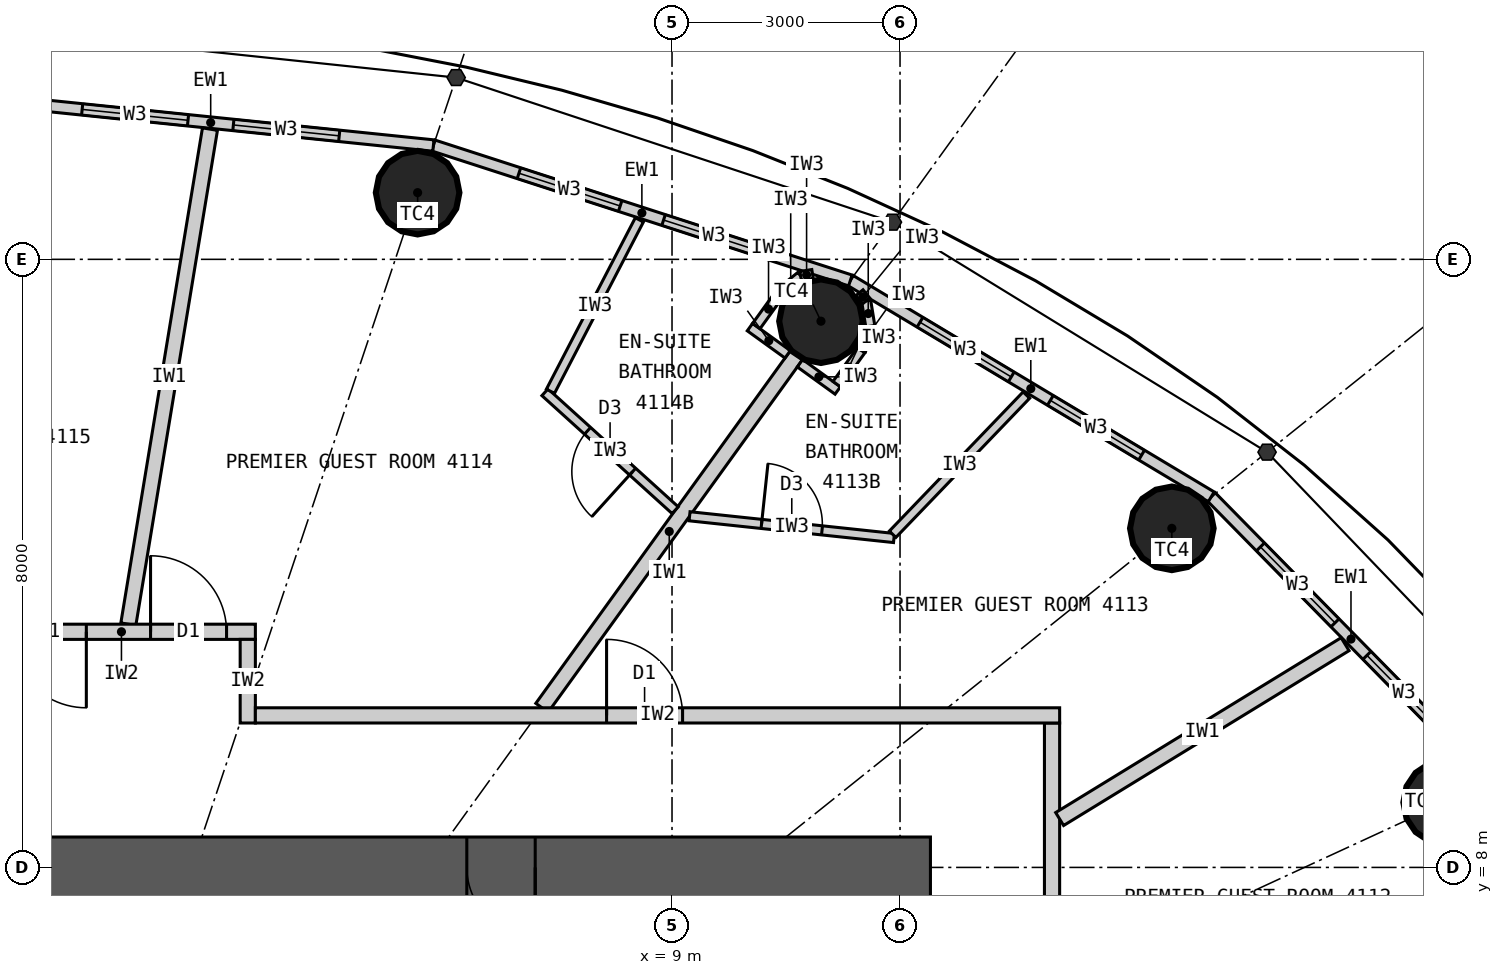
"""IFC4 building model, lengths in metres.
Left out: names, types, materials, properties, quantities, classifications, styles, units other than length and angle.
Written with IfcOpenShell. Run it as: python <this file> out.ifc"""

import sys

from ifc_helpers import new_model, si_unit, direction, frame, frame_2d, origin, origin_2d, place, context, subcontext, project, spatial, rectangle, circle, extrude, element, fill, save


model = new_model("IFC4")
c1 = context("Model", 3, precision=1e-05, world=origin(), true_north=direction((0.0, 1.0)))
c2 = subcontext(c1, "Body", "Model", "MODEL_VIEW")
j1 = project(units=[si_unit("LENGTHUNIT", "METRE"), si_unit("PLANEANGLEUNIT", "RADIAN")], contexts=[c1])
p1 = place(None, origin())
s1 = spatial("IfcSite", under=j1, at=p1, CompositionType="ELEMENT")
p2 = place(p1, origin())
s2 = spatial("IfcBuilding", under=s1, at=p2, CompositionType="ELEMENT")
p3 = place(p2, frame((0.0, 0.0, 156.6)))
s3 = spatial("IfcBuildingStorey", under=s2, at=p3, CompositionType="ELEMENT", Elevation=156.6)
for number, where, z_axis, x_axis in (
    (1, (19.172, 8.855, 0.0), (0.0, 0.0, 1.0), (1.0, 0.0, 0.0)),
    (2, (15.576, 12.461, 0.0), (0.0, 0.0, 1.0), (1.0, 0.0, 0.0)),
    (3, (10.96, 15.186, 0.0), (0.0, 0.0, 1.0), (1.0, 0.0, 0.0)),
    (4, (5.653, 16.877, 0.0), (0.0, 0.0, 1.0), (1.0, 0.0, 0.0)),
):
    element("IfcColumn", number, at=place(p3, frame(where, z_axis=z_axis, x_axis=x_axis)), inside=s3, PredefinedType="COLUMN", context=c2, shape_type="SweptSolid", body=[
        extrude(circle(Radius=0.55, at=origin_2d()), origin(), (0.0, 0.0, 1.0), 3.3),
    ])
p4 = place(p3, frame((-12.4, 8.0, 0.0), z_axis=(0.0, 0.0, 1.0), x_axis=(1.0, 0.0, 0.0)))
e5 = element("IfcWall", 5, at=p4, inside=s3, PredefinedType="SHEAR", context=c2, shape_type="SweptSolid", body=[
    extrude(rectangle(XDim=24.8, YDim=0.8, at=frame_2d((12.4, 0.0))), origin(), (0.0, 0.0, 1.0), 3.3),
])
p5 = place(p4, frame((11.1, 0.0, 0.0)))
e6 = element("IfcOpeningElement", 6, at=p5, cuts=e5, PredefinedType="OPENING", context=c2, shape_type="SweptSolid", body=[
    extrude(rectangle(XDim=1.2, YDim=2.2, at=frame_2d((0.6, 1.1))), frame((0.0, 0.41, 0.0), z_axis=(0.0, -1.0, 0.0), x_axis=(1.0, 0.0, 0.0)), (0.0, 0.0, 1.0), 0.82),
])
p6 = place(p4, frame((18.7, 0.0, 0.0)))
e7 = element("IfcOpeningElement", 7, at=p6, cuts=e5, PredefinedType="OPENING", context=c2, shape_type="SweptSolid", body=[
    extrude(rectangle(XDim=0.9, YDim=2.2, at=frame_2d((0.45, 1.1))), frame((0.0, 0.41, 0.0), z_axis=(0.0, -1.0, 0.0), x_axis=(1.0, 0.0, 0.0)), (0.0, 0.0, 1.0), 0.82),
])
p7 = place(p3, frame((19.772, 9.132, 0.0), z_axis=(0.0, 0.0, 1.0), x_axis=(-0.700727467776, 0.71342905457, 0.0)))
e8 = element("IfcWall", 8, at=p7, inside=s3, PredefinedType="ELEMENTEDWALL", context=c2, shape_type="SweptSolid", body=[
    extrude(rectangle(XDim=5.247, YDim=0.15, at=frame_2d((2.624, 0.0))), origin(), (0.0, 0.0, 1.0), 3.12),
])
p8 = place(p7, frame((0.924, 0.0, 0.9)))
e9 = element("IfcOpeningElement", 9, at=p8, cuts=e8, PredefinedType="OPENING", context=c2, shape_type="SweptSolid", body=[
    extrude(rectangle(XDim=1.4, YDim=1.9, at=frame_2d((0.7, 0.95))), frame((0.0, 0.085, 0.0), z_axis=(0.0, -1.0, 0.0), x_axis=(1.0, 0.0, 0.0)), (0.0, 0.0, 1.0), 0.17),
])
p9 = place(p7, frame((2.924, 0.0, 0.9)))
e10 = element("IfcOpeningElement", 10, at=p9, cuts=e8, PredefinedType="OPENING", context=c2, shape_type="SweptSolid", body=[
    extrude(rectangle(XDim=1.4, YDim=1.9, at=frame_2d((0.7, 0.95))), frame((0.0, 0.085, 0.0), z_axis=(0.0, -1.0, 0.0), x_axis=(1.0, 0.0, 0.0)), (0.0, 0.0, 1.0), 0.17),
])
p10 = place(p3, frame((16.095, 12.876, 0.0), z_axis=(0.0, 0.0, 1.0), x_axis=(-0.857695199231, 0.514158482587, 0.0)))
e11 = element("IfcWall", 11, at=p10, inside=s3, PredefinedType="ELEMENTEDWALL", context=c2, shape_type="SweptSolid", body=[
    extrude(rectangle(XDim=5.536, YDim=0.15, at=frame_2d((2.768, 0.0))), origin(), (0.0, 0.0, 1.0), 3.12),
])
p11 = place(p10, frame((1.068, 0.0, 0.9)))
e12 = element("IfcOpeningElement", 12, at=p11, cuts=e11, PredefinedType="OPENING", context=c2, shape_type="SweptSolid", body=[
    extrude(rectangle(XDim=1.4, YDim=1.9, at=frame_2d((0.7, 0.95))), frame((0.0, 0.085, 0.0), z_axis=(0.0, -1.0, 0.0), x_axis=(1.0, 0.0, 0.0)), (0.0, 0.0, 1.0), 0.17),
])
p12 = place(p10, frame((3.068, 0.0, 0.9)))
e13 = element("IfcOpeningElement", 13, at=p12, cuts=e11, PredefinedType="OPENING", context=c2, shape_type="SweptSolid", body=[
    extrude(rectangle(XDim=1.4, YDim=1.9, at=frame_2d((0.7, 0.95))), frame((0.0, 0.085, 0.0), z_axis=(0.0, -1.0, 0.0), x_axis=(1.0, 0.0, 0.0)), (0.0, 0.0, 1.0), 0.17),
])
p13 = place(p3, frame((11.346, 15.722, 0.0), z_axis=(0.0, 0.0, 1.0), x_axis=(-0.951432482129, 0.307857486429, 0.0)))
e14 = element("IfcWall", 14, at=p13, inside=s3, PredefinedType="ELEMENTEDWALL", context=c2, shape_type="SweptSolid", body=[
    extrude(rectangle(XDim=5.766, YDim=0.15, at=frame_2d((2.883, 0.0))), origin(), (0.0, 0.0, 1.0), 3.12),
])
p14 = place(p13, frame((1.183, 0.0, 0.9)))
e15 = element("IfcOpeningElement", 15, at=p14, cuts=e14, PredefinedType="OPENING", context=c2, shape_type="SweptSolid", body=[
    extrude(rectangle(XDim=1.4, YDim=1.9, at=frame_2d((0.7, 0.95))), frame((0.0, 0.085, 0.0), z_axis=(0.0, -1.0, 0.0), x_axis=(1.0, 0.0, 0.0)), (0.0, 0.0, 1.0), 0.17),
])
p15 = place(p13, frame((3.183, 0.0, 0.9)))
e16 = element("IfcOpeningElement", 16, at=p15, cuts=e14, PredefinedType="OPENING", context=c2, shape_type="SweptSolid", body=[
    extrude(rectangle(XDim=1.4, YDim=1.9, at=frame_2d((0.7, 0.95))), frame((0.0, 0.085, 0.0), z_axis=(0.0, -1.0, 0.0), x_axis=(1.0, 0.0, 0.0)), (0.0, 0.0, 1.0), 0.17),
])
p16 = place(p3, frame((5.86, 17.497, 0.0), z_axis=(0.0, 0.0, 1.0), x_axis=(-0.994751738032, 0.102318032045, 0.0)))
e17 = element("IfcWall", 17, at=p16, inside=s3, PredefinedType="ELEMENTEDWALL", context=c2, shape_type="SweptSolid", body=[
    extrude(rectangle(XDim=5.891, YDim=0.15, at=frame_2d((2.946, 0.0))), origin(), (0.0, 0.0, 1.0), 3.12),
])
p17 = place(p16, frame((1.246, 0.0, 0.9)))
e18 = element("IfcOpeningElement", 18, at=p17, cuts=e17, PredefinedType="OPENING", context=c2, shape_type="SweptSolid", body=[
    extrude(rectangle(XDim=1.4, YDim=1.9, at=frame_2d((0.7, 0.95))), frame((0.0, 0.085, 0.0), z_axis=(0.0, -1.0, 0.0), x_axis=(1.0, 0.0, 0.0)), (0.0, 0.0, 1.0), 0.17),
])
p18 = place(p16, frame((3.246, 0.0, 0.9)))
e19 = element("IfcOpeningElement", 19, at=p18, cuts=e17, PredefinedType="OPENING", context=c2, shape_type="SweptSolid", body=[
    extrude(rectangle(XDim=1.4, YDim=1.9, at=frame_2d((0.7, 0.95))), frame((0.0, 0.085, 0.0), z_axis=(0.0, -1.0, 0.0), x_axis=(1.0, 0.0, 0.0)), (0.0, 0.0, 1.0), 0.17),
])
p19 = place(p3, frame((14.0, -9.9, 0.0), z_axis=(0.0, 0.0, 1.0), x_axis=(0.0, 1.0, 0.0)))
e20 = element("IfcWall", 20, at=p19, inside=s3, PredefinedType="PARTITIONING", context=c2, shape_type="SweptSolid", body=[
    extrude(rectangle(XDim=19.8, YDim=0.2, at=frame_2d((9.9, 0.0))), origin(), (0.0, 0.0, 1.0), 3.12),
])
p20 = place(p19, frame((3.824, 0.0, 0.0)))
e21 = element("IfcOpeningElement", 21, at=p20, cuts=e20, PredefinedType="OPENING", context=c2, shape_type="SweptSolid", body=[
    extrude(rectangle(XDim=1.0, YDim=2.2, at=frame_2d((0.5, 1.1))), frame((0.0, 0.11, 0.0), z_axis=(0.0, -1.0, 0.0), x_axis=(1.0, 0.0, 0.0)), (0.0, 0.0, 1.0), 0.22),
])
p21 = place(p19, frame((8.719, 0.0, 0.0)))
e22 = element("IfcOpeningElement", 22, at=p21, cuts=e20, PredefinedType="OPENING", context=c2, shape_type="SweptSolid", body=[
    extrude(rectangle(XDim=1.0, YDim=2.2, at=frame_2d((0.5, 1.1))), frame((0.0, 0.11, 0.0), z_axis=(0.0, -1.0, 0.0), x_axis=(1.0, 0.0, 0.0)), (0.0, 0.0, 1.0), 0.22),
])
p22 = place(p19, frame((15.482, 0.0, 0.0)))
e23 = element("IfcOpeningElement", 23, at=p22, cuts=e20, PredefinedType="OPENING", context=c2, shape_type="SweptSolid", body=[
    extrude(rectangle(XDim=1.0, YDim=2.2, at=frame_2d((0.5, 1.1))), frame((0.0, 0.11, 0.0), z_axis=(0.0, -1.0, 0.0), x_axis=(1.0, 0.0, 0.0)), (0.0, 0.0, 1.0), 0.22),
])
p23 = place(p3, frame((14.1, 8.636, 0.0), z_axis=(0.0, 0.0, 1.0), x_axis=(0.852731884196, 0.522348862041, 0.0)))
e24 = element("IfcWall", 24, at=p23, inside=s3, PredefinedType="PARTITIONING", context=c2, shape_type="SweptSolid", body=[
    extrude(rectangle(XDim=4.404, YDim=0.2, at=frame_2d((2.202, 0.0))), origin(), (0.0, 0.0, 1.0), 3.12),
])
p24 = place(p3, frame((7.289, 10.1, 0.0), z_axis=(0.0, 0.0, 1.0), x_axis=(0.585222595178, 0.810872686735, 0.0)))
e25 = element("IfcWall", 25, at=p24, inside=s3, PredefinedType="PARTITIONING", context=c2, shape_type="SweptSolid", body=[
    extrude(rectangle(XDim=5.722, YDim=0.2, at=frame_2d((2.861, 0.0))), origin(), (0.0, 0.0, 1.0), 2.42),
])
p25 = place(p3, frame((1.847, 11.2, 0.0), z_axis=(0.0, 0.0, 1.0), x_axis=(0.162695449404, 0.986676335352, 0.0)))
e26 = element("IfcWall", 26, at=p25, inside=s3, PredefinedType="PARTITIONING", context=c2, shape_type="SweptSolid", body=[
    extrude(rectangle(XDim=6.601, YDim=0.2, at=frame_2d((3.301, 0.0))), origin(), (0.0, 0.0, 1.0), 3.12),
])
p26 = place(p3, frame((-0.006, 11.1, 0.0), z_axis=(0.0, 0.0, 1.0), x_axis=(1.0, 0.0, 0.0)))
e27 = element("IfcWall", 27, at=p26, inside=s3, PredefinedType="PARTITIONING", context=c2, shape_type="SweptSolid", body=[
    extrude(rectangle(XDim=3.524, YDim=0.2, at=frame_2d((1.762, 0.0))), origin(), (0.0, 0.0, 1.0), 3.12),
])
p27 = place(p26, frame((2.145, 0.0, 0.0)))
e28 = element("IfcOpeningElement", 28, at=p27, cuts=e27, PredefinedType="OPENING", context=c2, shape_type="SweptSolid", body=[
    extrude(rectangle(XDim=1.0, YDim=2.2, at=frame_2d((0.5, 1.1))), frame((0.0, 0.11, 0.0), z_axis=(0.0, -1.0, 0.0), x_axis=(1.0, 0.0, 0.0)), (0.0, 0.0, 1.0), 0.22),
])
p28 = place(p26, frame((0.3, 0.0, 0.0)))
e29 = element("IfcOpeningElement", 29, at=p28, cuts=e27, PredefinedType="OPENING", context=c2, shape_type="SweptSolid", body=[
    extrude(rectangle(XDim=1.0, YDim=2.2, at=frame_2d((0.5, 1.1))), frame((0.0, 0.11, 0.0), z_axis=(0.0, -1.0, 0.0), x_axis=(1.0, 0.0, 0.0)), (0.0, 0.0, 1.0), 0.22),
])
p29 = place(p3, frame((3.418, 9.9, 0.0), z_axis=(0.0, 0.0, 1.0), x_axis=(0.0, 1.0, 0.0)))
e30 = element("IfcWall", 30, at=p29, inside=s3, PredefinedType="PARTITIONING", context=c2, shape_type="SweptSolid", body=[
    extrude(rectangle(XDim=1.1, YDim=0.2, at=frame_2d((0.55, 0.0))), origin(), (0.0, 0.0, 1.0), 3.12),
])
p30 = place(p3, frame((9.231, 12.62, 0.0), z_axis=(0.0, 0.0, 1.0), x_axis=(0.99437860496, -0.10588290701, 0.0)))
e31 = element("IfcWall", 31, at=p30, inside=s3, PredefinedType="PARTITIONING", context=c2, shape_type="SweptSolid", body=[
    extrude(rectangle(XDim=2.705, YDim=0.12, at=frame_2d((1.352, 0.0))), origin(), (0.0, 0.0, 1.0), 3.12),
])
p31 = place(p30, frame((0.952, 0.0, 0.0)))
e32 = element("IfcOpeningElement", 32, at=p31, cuts=e31, PredefinedType="OPENING", context=c2, shape_type="SweptSolid", body=[
    extrude(rectangle(XDim=0.8, YDim=2.1, at=frame_2d((0.4, 1.05))), frame((0.0, 0.07, 0.0), z_axis=(0.0, -1.0, 0.0), x_axis=(1.0, 0.0, 0.0)), (0.0, 0.0, 1.0), 0.14),
])
p32 = place(p3, frame((11.902, 12.383, 0.0), z_axis=(0.0, 0.0, 1.0), x_axis=(0.69298385335, 0.720953104574, 0.0)))
e33 = element("IfcWall", 33, at=p32, inside=s3, PredefinedType="PARTITIONING", context=c2, shape_type="SweptSolid", body=[
    extrude(rectangle(XDim=2.54, YDim=0.12, at=frame_2d((1.27, 0.0))), origin(), (0.0, 0.0, 1.0), 3.12),
])
p33 = place(p3, frame((10.684, 14.633, 0.0), z_axis=(0.0, 0.0, 1.0), x_axis=(0.810921075692, -0.585155542568, 0.0)))
e34 = element("IfcWall", 34, at=p33, inside=s3, PredefinedType="PARTITIONING", context=c2, shape_type="SweptSolid", body=[
    extrude(rectangle(XDim=0.612, YDim=0.12, at=frame_2d((0.306, 0.0))), origin(), (0.0, 0.0, 1.0), 3.12),
])
p34 = place(p3, frame((11.167, 14.359, 0.0), z_axis=(0.0, 0.0, 1.0), x_axis=(0.585263549799, 0.810843127415, 0.0)))
e35 = element("IfcWall", 35, at=p34, inside=s3, PredefinedType="PARTITIONING", context=c2, shape_type="SweptSolid", body=[
    extrude(rectangle(XDim=0.55, YDim=0.12, at=frame_2d((0.275, 0.0))), origin(), (0.0, 0.0, 1.0), 3.12),
])
for number, where, z_axis, x_axis in (
    (36, (11.489, 14.804, 0.0), (0.0, 0.0, 1.0), (0.356, 0.935, 0.0)),
    (37, (11.609, 15.12, 0.0), (0.0, 0.0, 1.0), (-0.16, 0.987, 0.0)),
):
    element("IfcWall", number, at=place(p3, frame(where, z_axis=z_axis, x_axis=x_axis)), inside=s3, PredefinedType="PARTITIONING", context=c2, shape_type="SweptSolid", body=[
        extrude(rectangle(XDim=0.338, YDim=0.12, at=frame_2d((0.169, 0.0))), origin(), (0.0, 0.0, 1.0), 3.12),
    ])
p35 = place(p3, frame((11.555, 15.453, 0.0), z_axis=(0.0, 0.0, 1.0), x_axis=(-0.631711901025, 0.775203246964, 0.0)))
e38 = element("IfcWall", 38, at=p35, inside=s3, PredefinedType="PARTITIONING", context=c2, shape_type="SweptSolid", body=[
    extrude(rectangle(XDim=0.139, YDim=0.12, at=frame_2d((0.07, 0.0))), origin(), (0.0, 0.0, 1.0), 3.12),
])
p36 = place(p3, frame((9.042, 12.699, 0.0), z_axis=(0.0, 0.0, 1.0), x_axis=(-0.741100257539, 0.671394376112, 0.0)))
e39 = element("IfcWall", 39, at=p36, inside=s3, PredefinedType="PARTITIONING", context=c2, shape_type="SweptSolid", body=[
    extrude(rectangle(XDim=2.312, YDim=0.12, at=frame_2d((1.156, 0.0))), origin(), (0.0, 0.0, 1.0), 3.12),
])
p37 = place(p36, frame((0.756, 0.0, 0.0)))
e40 = element("IfcOpeningElement", 40, at=p37, cuts=e39, PredefinedType="OPENING", context=c2, shape_type="SweptSolid", body=[
    extrude(rectangle(XDim=0.8, YDim=2.1, at=frame_2d((0.4, 1.05))), frame((0.0, 0.07, 0.0), z_axis=(0.0, -1.0, 0.0), x_axis=(1.0, 0.0, 0.0)), (0.0, 0.0, 1.0), 0.14),
])
p38 = place(p3, frame((7.401, 14.264, 0.0), z_axis=(0.0, 0.0, 1.0), x_axis=(0.460505131319, 0.887657041897, 0.0)))
e41 = element("IfcWall", 41, at=p38, inside=s3, PredefinedType="PARTITIONING", context=c2, shape_type="SweptSolid", body=[
    extrude(rectangle(XDim=2.54, YDim=0.12, at=frame_2d((1.27, 0.0))), origin(), (0.0, 0.0, 1.0), 3.12),
])
p39 = place(p3, frame((10.522, 14.75, 0.0), z_axis=(0.0, 0.0, 1.0), x_axis=(-0.811057588427, 0.584966313777, 0.0)))
e42 = element("IfcWall", 42, at=p39, inside=s3, PredefinedType="PARTITIONING", context=c2, shape_type="SweptSolid", body=[
    extrude(rectangle(XDim=0.612, YDim=0.12, at=frame_2d((0.306, 0.0))), origin(), (0.0, 0.0, 1.0), 3.12),
])
p40 = place(p3, frame((10.109, 15.122, 0.0), z_axis=(0.0, 0.0, 1.0), x_axis=(0.585344718358, 0.810784534072, 0.0)))
e43 = element("IfcWall", 43, at=p40, inside=s3, PredefinedType="PARTITIONING", context=c2, shape_type="SweptSolid", body=[
    extrude(rectangle(XDim=0.55, YDim=0.12, at=frame_2d((0.275, 0.0))), origin(), (0.0, 0.0, 1.0), 3.12),
])
p41 = place(p3, frame((10.431, 15.568, 0.0), z_axis=(0.0, 0.0, 1.0), x_axis=(0.77505137267, 0.631898227345, 0.0)))
e44 = element("IfcWall", 44, at=p41, inside=s3, PredefinedType="PARTITIONING", context=c2, shape_type="SweptSolid", body=[
    extrude(rectangle(XDim=0.338, YDim=0.12, at=frame_2d((0.169, 0.0))), origin(), (0.0, 0.0, 1.0), 3.12),
])
p42 = place(p3, frame((10.693, 15.781, 0.0), z_axis=(0.0, 0.0, 1.0), x_axis=(0.987256785332, 0.159135287777, 0.0)))
e45 = element("IfcWall", 45, at=p42, inside=s3, PredefinedType="PARTITIONING", context=c2, shape_type="SweptSolid", body=[
    extrude(rectangle(XDim=0.158, YDim=0.12, at=frame_2d((0.079, 0.0))), origin(), (0.0, 0.0, 1.0), 3.12),
])
p43 = place(p3, frame((3.518, 10.0, 0.0), z_axis=(0.0, 0.0, 1.0), x_axis=(1.0, 0.0, 0.0)))
e46 = element("IfcWall", 46, at=p43, inside=s3, PredefinedType="PARTITIONING", context=c2, shape_type="SweptSolid", body=[
    extrude(rectangle(XDim=10.582, YDim=0.2, at=frame_2d((5.291, 0.0))), origin(), (0.0, 0.0, 1.0), 3.12),
])
p44 = place(p43, frame((4.621, 0.0, 0.0)))
e47 = element("IfcOpeningElement", 47, at=p44, cuts=e46, PredefinedType="OPENING", context=c2, shape_type="SweptSolid", body=[
    extrude(rectangle(XDim=1.0, YDim=2.2, at=frame_2d((0.5, 1.1))), frame((0.0, 0.11, 0.0), z_axis=(0.0, -1.0, 0.0), x_axis=(1.0, 0.0, 0.0)), (0.0, 0.0, 1.0), 0.22),
])
p45 = place(p8, origin())
e48 = element("IfcWindow", 48, at=p45, inside=s3, PartitioningType="SINGLE_PANEL", PredefinedType="WINDOW", context=c2, shape_type="SweptSolid", body=[
    extrude(rectangle(XDim=1.4, YDim=1.9, at=frame_2d((0.7, 0.95))), frame((0.0, 0.03, 0.0), z_axis=(0.0, -1.0, 0.0), x_axis=(1.0, 0.0, 0.0)), (0.0, 0.0, 1.0), 0.06),
])
fill(e9, e48)
p46 = place(p9, origin())
e49 = element("IfcWindow", 49, at=p46, inside=s3, PartitioningType="SINGLE_PANEL", PredefinedType="WINDOW", context=c2, shape_type="SweptSolid", body=[
    extrude(rectangle(XDim=1.4, YDim=1.9, at=frame_2d((0.7, 0.95))), frame((0.0, 0.03, 0.0), z_axis=(0.0, -1.0, 0.0), x_axis=(1.0, 0.0, 0.0)), (0.0, 0.0, 1.0), 0.06),
])
fill(e10, e49)
p47 = place(p11, origin())
e50 = element("IfcWindow", 50, at=p47, inside=s3, PartitioningType="SINGLE_PANEL", PredefinedType="WINDOW", context=c2, shape_type="SweptSolid", body=[
    extrude(rectangle(XDim=1.4, YDim=1.9, at=frame_2d((0.7, 0.95))), frame((0.0, 0.03, 0.0), z_axis=(0.0, -1.0, 0.0), x_axis=(1.0, 0.0, 0.0)), (0.0, 0.0, 1.0), 0.06),
])
fill(e12, e50)
p48 = place(p12, origin())
e51 = element("IfcWindow", 51, at=p48, inside=s3, PartitioningType="SINGLE_PANEL", PredefinedType="WINDOW", context=c2, shape_type="SweptSolid", body=[
    extrude(rectangle(XDim=1.4, YDim=1.9, at=frame_2d((0.7, 0.95))), frame((0.0, 0.03, 0.0), z_axis=(0.0, -1.0, 0.0), x_axis=(1.0, 0.0, 0.0)), (0.0, 0.0, 1.0), 0.06),
])
fill(e13, e51)
p49 = place(p14, origin())
e52 = element("IfcWindow", 52, at=p49, inside=s3, PartitioningType="SINGLE_PANEL", PredefinedType="WINDOW", context=c2, shape_type="SweptSolid", body=[
    extrude(rectangle(XDim=1.4, YDim=1.9, at=frame_2d((0.7, 0.95))), frame((0.0, 0.03, 0.0), z_axis=(0.0, -1.0, 0.0), x_axis=(1.0, 0.0, 0.0)), (0.0, 0.0, 1.0), 0.06),
])
fill(e15, e52)
p50 = place(p15, origin())
e53 = element("IfcWindow", 53, at=p50, inside=s3, PartitioningType="SINGLE_PANEL", PredefinedType="WINDOW", context=c2, shape_type="SweptSolid", body=[
    extrude(rectangle(XDim=1.4, YDim=1.9, at=frame_2d((0.7, 0.95))), frame((0.0, 0.03, 0.0), z_axis=(0.0, -1.0, 0.0), x_axis=(1.0, 0.0, 0.0)), (0.0, 0.0, 1.0), 0.06),
])
fill(e16, e53)
p51 = place(p17, origin())
e54 = element("IfcWindow", 54, at=p51, inside=s3, PartitioningType="SINGLE_PANEL", PredefinedType="WINDOW", context=c2, shape_type="SweptSolid", body=[
    extrude(rectangle(XDim=1.4, YDim=1.9, at=frame_2d((0.7, 0.95))), frame((0.0, 0.03, 0.0), z_axis=(0.0, -1.0, 0.0), x_axis=(1.0, 0.0, 0.0)), (0.0, 0.0, 1.0), 0.06),
])
fill(e18, e54)
p52 = place(p18, origin())
e55 = element("IfcWindow", 55, at=p52, inside=s3, PartitioningType="SINGLE_PANEL", PredefinedType="WINDOW", context=c2, shape_type="SweptSolid", body=[
    extrude(rectangle(XDim=1.4, YDim=1.9, at=frame_2d((0.7, 0.95))), frame((0.0, 0.03, 0.0), z_axis=(0.0, -1.0, 0.0), x_axis=(1.0, 0.0, 0.0)), (0.0, 0.0, 1.0), 0.06),
])
fill(e19, e55)
p53 = place(p31, origin())
e56 = element("IfcDoor", 56, at=p53, inside=s3, OperationType="SINGLE_SWING_LEFT", PredefinedType="DOOR", context=c2, shape_type="SweptSolid", body=[
    extrude(rectangle(XDim=0.8, YDim=2.1, at=frame_2d((0.4, 1.05))), frame((0.0, 0.025, 0.0), z_axis=(0.0, -1.0, 0.0), x_axis=(1.0, 0.0, 0.0)), (0.0, 0.0, 1.0), 0.05),
])
fill(e32, e56)
p54 = place(p44, origin())
e57 = element("IfcDoor", 57, at=p54, inside=s3, OperationType="SINGLE_SWING_LEFT", PredefinedType="DOOR", context=c2, shape_type="SweptSolid", body=[
    extrude(rectangle(XDim=1.0, YDim=2.2, at=frame_2d((0.5, 1.1))), frame((0.0, 0.025, 0.0), z_axis=(0.0, -1.0, 0.0), x_axis=(1.0, 0.0, 0.0)), (0.0, 0.0, 1.0), 0.05),
])
fill(e47, e57)
p55 = place(p37, origin())
e58 = element("IfcDoor", 58, at=p55, inside=s3, OperationType="SINGLE_SWING_LEFT", PredefinedType="DOOR", context=c2, shape_type="SweptSolid", body=[
    extrude(rectangle(XDim=0.8, YDim=2.1, at=frame_2d((0.4, 1.05))), frame((0.0, 0.025, 0.0), z_axis=(0.0, -1.0, 0.0), x_axis=(1.0, 0.0, 0.0)), (0.0, 0.0, 1.0), 0.05),
])
fill(e40, e58)
p56 = place(p27, origin())
e59 = element("IfcDoor", 59, at=p56, inside=s3, OperationType="SINGLE_SWING_LEFT", PredefinedType="DOOR", context=c2, shape_type="SweptSolid", body=[
    extrude(rectangle(XDim=1.0, YDim=2.2, at=frame_2d((0.5, 1.1))), frame((0.0, 0.025, 0.0), z_axis=(0.0, -1.0, 0.0), x_axis=(1.0, 0.0, 0.0)), (0.0, 0.0, 1.0), 0.05),
])
fill(e28, e59)
p57 = place(p28, origin())
e60 = element("IfcDoor", 60, at=p57, inside=s3, OperationType="SINGLE_SWING_RIGHT", PredefinedType="DOOR", context=c2, shape_type="SweptSolid", body=[
    extrude(rectangle(XDim=1.0, YDim=2.2, at=frame_2d((0.5, 1.1))), frame((0.0, 0.025, 0.0), z_axis=(0.0, -1.0, 0.0), x_axis=(1.0, 0.0, 0.0)), (0.0, 0.0, 1.0), 0.05),
])
fill(e29, e60)
p58 = place(p6, origin())
e61 = element("IfcDoor", 61, at=p58, inside=s3, OperationType="SINGLE_SWING_RIGHT", PredefinedType="DOOR", context=c2, shape_type="SweptSolid", body=[
    extrude(rectangle(XDim=0.9, YDim=2.2, at=frame_2d((0.45, 1.1))), frame((0.0, 0.025, 0.0), z_axis=(0.0, -1.0, 0.0), x_axis=(1.0, 0.0, 0.0)), (0.0, 0.0, 1.0), 0.05),
])
fill(e7, e61)
save(model, sys.argv[1])
